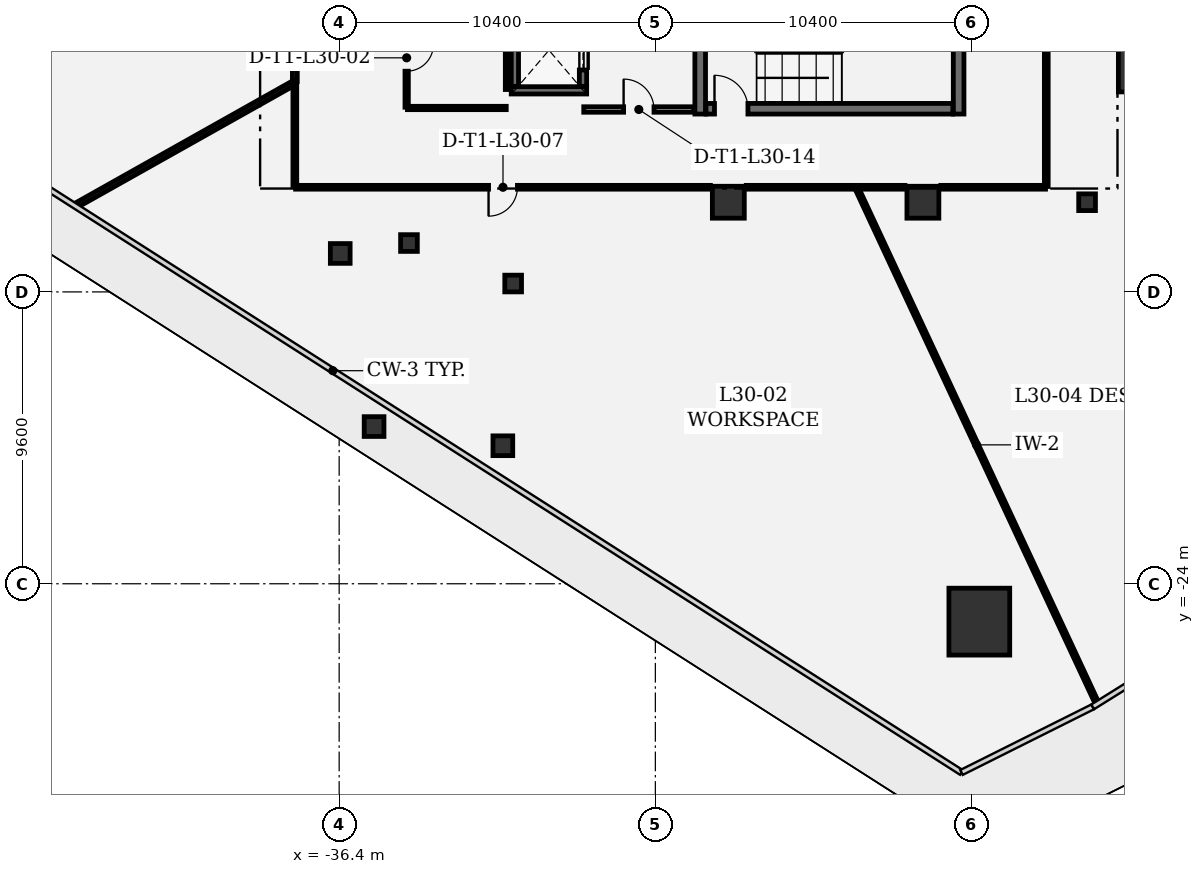
"""IFC4 building model, lengths in metres.
Left out: names, types, materials, properties, quantities, classifications, styles, units other than length and angle.
Written with IfcOpenShell. Run it as: python <this file> out.ifc"""

import sys

from ifc_helpers import new_model, si_unit, direction, frame, frame_2d, origin, origin_2d, place, context, subcontext, project, spatial, rectangle, extrude, element, fill, save


model = new_model("IFC4")
c1 = context("Model", 3, precision=1e-05, world=origin(), true_north=direction((0.0, 1.0)))
c2 = subcontext(c1, "Body", "Model", "MODEL_VIEW")
j1 = project(units=[si_unit("LENGTHUNIT", "METRE"), si_unit("PLANEANGLEUNIT", "RADIAN")], contexts=[c1])
p1 = place(None, origin())
s1 = spatial("IfcSite", under=j1, at=p1, CompositionType="ELEMENT")
p2 = place(p1, origin())
s2 = spatial("IfcBuilding", under=s1, at=p2, CompositionType="ELEMENT")
p3 = place(p2, frame((0.0, 0.0, 134.1)))
s3 = spatial("IfcBuildingStorey", under=s2, at=p3, CompositionType="ELEMENT", Elevation=134.1)
for number, where, z_axis, x_axis in (
    (1, (-15.344, -25.246, 0.0), (0.0, 0.0, 1.0), (1.0, 0.0, 0.0)),
    (2, (-9.77, -6.721, 0.0), (0.0, 0.0, 1.0), (1.0, 0.0, 0.0)),
):
    element("IfcColumn", number, at=place(p3, frame(where, z_axis=z_axis, x_axis=x_axis)), inside=s3, PredefinedType="COLUMN", context=c2, shape_type="SweptSolid", body=[
        extrude(rectangle(XDim=2.0, YDim=2.2, at=origin_2d()), origin(), (0.0, 0.0, 1.0), 4.05),
    ])
for number, where, z_axis, x_axis in (
    (3, (-17.2, -11.45, 0.0), (0.0, 0.0, 1.0), (1.0, 0.0, 0.0)),
    (4, (-23.6, -11.45, 0.0), (0.0, 0.0, 1.0), (1.0, 0.0, 0.0)),
):
    element("IfcColumn", number, at=place(p3, frame(where, z_axis=z_axis, x_axis=x_axis)), inside=s3, PredefinedType="COLUMN", context=c2, shape_type="SweptSolid", body=[
        extrude(rectangle(XDim=1.05, YDim=1.05, at=origin_2d()), origin(), (0.0, 0.0, 1.0), 4.05),
    ])
for number, where, z_axis, x_axis in (
    (5, (-35.252, -18.829, 0.0), (0.0, 0.0, 1.0), (1.0, 0.0, 0.0)),
    (6, (-31.016, -19.46, 0.0), (0.0, 0.0, 1.0), (1.0, 0.0, 0.0)),
    (7, (-36.365, -13.135, 0.0), (0.0, 0.0, 1.0), (1.0, 0.0, 0.0)),
):
    element("IfcColumn", number, at=place(p3, frame(where, z_axis=z_axis, x_axis=x_axis)), inside=s3, PredefinedType="COLUMN", context=c2, shape_type="SweptSolid", body=[
        extrude(rectangle(XDim=0.65, YDim=0.65, at=origin_2d()), origin(), (0.0, 0.0, 1.0), 4.05),
    ])
for number, where, z_axis, x_axis in (
    (8, (-34.104, -12.792, 0.0), (0.0, 0.0, 1.0), (1.0, 0.0, 0.0)),
    (9, (-30.677, -14.124, 0.0), (0.0, 0.0, 1.0), (1.0, 0.0, 0.0)),
    (10, (-11.8, -11.45, 0.0), (0.0, 0.0, 1.0), (1.0, 0.0, 0.0)),
):
    element("IfcColumn", number, at=place(p3, frame(where, z_axis=z_axis, x_axis=x_axis)), inside=s3, PredefinedType="COLUMN", context=c2, shape_type="SweptSolid", body=[
        extrude(rectangle(XDim=0.55, YDim=0.55, at=origin_2d()), origin(), (0.0, 0.0, 1.0), 4.05),
    ])
for number, where, z_axis, x_axis in (
    (11, (-24.525, -4.34, 0.0), (0.0, 0.0, 1.0), (0.0, -1.0, 0.0)),
    (12, (-16.025, -8.55, 0.0), (0.0, 0.0, 1.0), (0.0, 1.0, 0.0)),
):
    element("IfcWall", number, at=place(p3, frame(where, z_axis=z_axis, x_axis=x_axis)), inside=s3, PredefinedType="SHEAR", context=c2, shape_type="SweptSolid", body=[
        extrude(rectangle(XDim=4.21, YDim=0.35, at=frame_2d((2.105, 0.0))), origin(), (0.0, 0.0, 1.0), 3.78),
    ])
p4 = place(p3, frame((-24.335, -8.375, 0.0), z_axis=(0.0, 0.0, 1.0), x_axis=(1.0, 0.0, 0.0)))
e13 = element("IfcWall", 13, at=p4, inside=s3, PredefinedType="SHEAR", context=c2, shape_type="SweptSolid", body=[
    extrude(rectangle(XDim=8.12, YDim=0.35, at=frame_2d((4.06, 0.0))), origin(), (0.0, 0.0, 1.0), 3.78),
])
p5 = place(p4, frame((0.28, 0.0, 0.0)))
e14 = element("IfcOpeningElement", 14, at=p5, cuts=e13, PredefinedType="OPENING", context=c2, shape_type="SweptSolid", body=[
    extrude(rectangle(XDim=1.1, YDim=2.2, at=frame_2d((0.55, 1.1))), frame((0.0, 0.185, 0.0), z_axis=(0.0, -1.0, 0.0), x_axis=(1.0, 0.0, 0.0)), (0.0, 0.0, 1.0), 0.37),
])
p6 = place(p3, frame((-28.26, -7.77, 0.0), z_axis=(0.0, 0.0, 1.0), x_axis=(-1.0, 0.0, 0.0)))
e15 = element("IfcWall", 15, at=p6, inside=s3, PredefinedType="SHEAR", context=c2, shape_type="SweptSolid", body=[
    extrude(rectangle(XDim=2.48, YDim=0.24, at=frame_2d((1.24, 0.0))), origin(), (0.0, 0.0, 1.0), 3.78),
])
p7 = place(p3, frame((-30.62, -7.638, 0.0), z_axis=(0.0, 0.0, 1.0), x_axis=(0.0, 1.0, 0.0)))
e16 = element("IfcWall", 16, at=p7, inside=s3, PredefinedType="SHEAR", context=c2, shape_type="SweptSolid", body=[
    extrude(rectangle(XDim=2.376, YDim=0.24, at=frame_2d((1.188, 0.0))), origin(), (0.0, 0.0, 1.0), 3.78),
])
p8 = place(p3, frame((-28.38, -5.262, 0.0), z_axis=(0.0, 0.0, 1.0), x_axis=(0.0, -1.0, 0.0)))
e17 = element("IfcWall", 17, at=p8, inside=s3, PredefinedType="SHEAR", context=c2, shape_type="SweptSolid", body=[
    extrude(rectangle(XDim=2.376, YDim=0.24, at=frame_2d((1.188, 0.0))), origin(), (0.0, 0.0, 1.0), 3.78),
])
p9 = place(p8, frame((0.538, 0.0, 0.0)))
e18 = element("IfcOpeningElement", 18, at=p9, cuts=e17, PredefinedType="OPENING", context=c2, shape_type="SweptSolid", body=[
    extrude(rectangle(XDim=1.3, YDim=2.3, at=frame_2d((0.65, 1.15))), frame((0.0, 0.13, 0.0), z_axis=(0.0, -1.0, 0.0), x_axis=(1.0, 0.0, 0.0)), (0.0, 0.0, 1.0), 0.26),
])
p10 = place(p3, frame((-28.355, -8.4, 0.0), z_axis=(0.0, 0.0, 1.0), x_axis=(1.0, 0.0, 0.0)))
e19 = element("IfcWall", 19, at=p10, inside=s3, PredefinedType="PARTITIONING", context=c2, shape_type="SweptSolid", body=[
    extrude(rectangle(XDim=3.622, YDim=0.18, at=frame_2d((1.811, 0.0))), origin(), (0.0, 0.0, 1.0), 3.78),
])
p11 = place(p10, frame((1.311, 0.0, 0.0)))
e20 = element("IfcOpeningElement", 20, at=p11, cuts=e19, PredefinedType="OPENING", context=c2, shape_type="SweptSolid", body=[
    extrude(rectangle(XDim=1.0, YDim=2.15, at=frame_2d((0.5, 1.075))), frame((0.0, 0.1, 0.0), z_axis=(0.0, -1.0, 0.0), x_axis=(1.0, 0.0, 0.0)), (0.0, 0.0, 1.0), 0.2),
])
p12 = place(p3, frame((-34.155, -8.35, 0.0), z_axis=(0.0, 0.0, 1.0), x_axis=(1.0, 0.0, 0.0)))
e21 = element("IfcWall", 21, at=p12, inside=s3, PredefinedType="PARTITIONING", context=c2, shape_type="SweptSolid", body=[
    extrude(rectangle(XDim=3.25, YDim=0.11, at=frame_2d((1.625, 0.0))), origin(), (0.0, 0.0, 1.0), 3.78),
])
p13 = place(p3, frame((-30.88, -7.743, 0.0), z_axis=(0.0, 0.0, 1.0), x_axis=(0.0, 1.0, 0.0)))
e22 = element("IfcWall", 22, at=p13, inside=s3, PredefinedType="PARTITIONING", context=c2, shape_type="SweptSolid", body=[
    extrude(rectangle(XDim=2.003, YDim=0.11, at=frame_2d((1.001, 0.0))), origin(), (0.0, 0.0, 1.0), 3.78),
])
p14 = place(p3, frame((-34.18, -5.075, 0.0), z_axis=(0.0, 0.0, 1.0), x_axis=(0.0, -1.0, 0.0)))
e23 = element("IfcWall", 23, at=p14, inside=s3, PredefinedType="PARTITIONING", context=c2, shape_type="SweptSolid", body=[
    extrude(rectangle(XDim=3.25, YDim=0.11, at=frame_2d((1.625, 0.0))), origin(), (0.0, 0.0, 1.0), 3.78),
])
p15 = place(p14, frame((1.185, 0.0, 0.0)))
e24 = element("IfcOpeningElement", 24, at=p15, cuts=e23, PredefinedType="OPENING", context=c2, shape_type="SweptSolid", body=[
    extrude(rectangle(XDim=0.88, YDim=2.1, at=frame_2d((0.44, 1.05))), frame((0.0, 0.065, 0.0), z_axis=(0.0, -1.0, 0.0), x_axis=(1.0, 0.0, 0.0)), (0.0, 0.0, 1.0), 0.13),
])
p16 = place(p3, frame((-37.858, -7.484, 0.0), z_axis=(0.0, 0.0, 1.0), x_axis=(0.0, 1.0, 0.0)))
e25 = element("IfcWall", 25, at=p16, inside=s3, PredefinedType="PARTITIONING", context=c2, shape_type="SweptSolid", body=[
    extrude(rectangle(XDim=2.701, YDim=0.16, at=frame_2d((1.35, 0.0))), origin(), (0.0, 0.0, 1.0), 3.78),
])
p17 = place(p3, frame((-45.017, -11.534, 0.0), z_axis=(0.0, 0.0, 1.0), x_axis=(0.871706095803, 0.490029062954, 0.0)))
e26 = element("IfcWall", 26, at=p17, inside=s3, PredefinedType="PARTITIONING", context=c2, shape_type="SweptSolid", body=[
    extrude(rectangle(XDim=8.188, YDim=0.16, at=frame_2d((4.094, 0.0))), origin(), (0.0, 0.0, 1.0), 3.344),
])
p18 = place(p3, frame((-24.19, -10.958, 0.0), z_axis=(0.0, 0.0, 1.0), x_axis=(-1.0, 0.0, 0.0)))
e27 = element("IfcWall", 27, at=p18, inside=s3, PredefinedType="PARTITIONING", context=c2, shape_type="SweptSolid", body=[
    extrude(rectangle(XDim=13.643, YDim=0.125, at=frame_2d((6.822, 0.0))), origin(), (0.0, 0.0, 1.0), 3.344),
])
p19 = place(p18, frame((6.346, 0.0, 0.0)))
e28 = element("IfcOpeningElement", 28, at=p19, cuts=e27, PredefinedType="OPENING", context=c2, shape_type="SweptSolid", body=[
    extrude(rectangle(XDim=0.95, YDim=2.15, at=frame_2d((0.475, 1.075))), frame((0.0, 0.073, 0.0), z_axis=(0.0, -1.0, 0.0), x_axis=(1.0, 0.0, 0.0)), (0.0, 0.0, 1.0), 0.145),
])
p20 = place(p3, frame((-37.858, -7.632, 0.0), z_axis=(0.0, 0.0, 1.0), x_axis=(0.0, -1.0, 0.0)))
e29 = element("IfcWall", 29, at=p20, inside=s3, PredefinedType="PARTITIONING", context=c2, shape_type="SweptSolid", body=[
    extrude(rectangle(XDim=3.302, YDim=0.125, at=frame_2d((1.651, 0.0))), origin(), (0.0, 0.0, 1.0), 3.78),
])
p21 = place(p3, frame((-11.496, -27.882, 0.0), z_axis=(0.0, 0.0, 1.0), x_axis=(-0.422692669293, 0.906273086507, 0.0)))
e30 = element("IfcWall", 30, at=p21, inside=s3, PredefinedType="PARTITIONING", context=c2, shape_type="SweptSolid", body=[
    extrude(rectangle(XDim=18.649, YDim=0.125, at=frame_2d((9.324, 0.0))), origin(), (0.0, 0.0, 1.0), 3.344),
])
p22 = place(p3, frame((-19.414, -10.958, 0.0), z_axis=(0.0, 0.0, 1.0), x_axis=(-1.0, 0.0, 0.0)))
e31 = element("IfcWall", 31, at=p22, inside=s3, PredefinedType="PARTITIONING", context=c2, shape_type="SweptSolid", body=[
    extrude(rectangle(XDim=3.596, YDim=0.125, at=frame_2d((1.798, 0.0))), origin(), (0.0, 0.0, 1.0), 3.78),
])
p23 = place(p3, frame((-17.79, -10.958, 0.0), z_axis=(0.0, 0.0, 1.0), x_axis=(-1.0, 0.0, 0.0)))
e32 = element("IfcWall", 32, at=p23, inside=s3, PredefinedType="PARTITIONING", context=c2, shape_type="SweptSolid", body=[
    extrude(rectangle(XDim=1.48, YDim=0.125, at=frame_2d((0.74, 0.0))), origin(), (0.0, 0.0, 1.0), 3.78),
])
p24 = place(p3, frame((-13.142, -0.604, 0.0), z_axis=(0.0, 0.0, 1.0), x_axis=(0.0, -1.0, 0.0)))
e33 = element("IfcWall", 33, at=p24, inside=s3, PredefinedType="PARTITIONING", context=c2, shape_type="SweptSolid", body=[
    extrude(rectangle(XDim=10.33, YDim=0.125, at=frame_2d((5.165, 0.0))), origin(), (0.0, 0.0, 1.0), 3.78),
])
p25 = place(p24, frame((4.69, 0.0, 0.0)))
e34 = element("IfcOpeningElement", 34, at=p25, cuts=e33, PredefinedType="OPENING", context=c2, shape_type="SweptSolid", body=[
    extrude(rectangle(XDim=0.95, YDim=2.15, at=frame_2d((0.475, 1.075))), frame((0.0, 0.073, 0.0), z_axis=(0.0, -1.0, 0.0), x_axis=(1.0, 0.0, 0.0)), (0.0, 0.0, 1.0), 0.145),
])
p26 = place(p3, frame((-13.167, -10.958, 0.0), z_axis=(0.0, 0.0, 1.0), x_axis=(-1.0, 0.0, 0.0)))
e35 = element("IfcWall", 35, at=p26, inside=s3, PredefinedType="PARTITIONING", context=c2, shape_type="SweptSolid", body=[
    extrude(rectangle(XDim=3.443, YDim=0.125, at=frame_2d((1.722, 0.0))), origin(), (0.0, 0.0, 1.0), 2.895),
])
p27 = place(p5, origin())
e36 = element("IfcDoor", 36, at=p27, inside=s3, OperationType="SINGLE_SWING_LEFT", PredefinedType="DOOR", context=c2, shape_type="SweptSolid", body=[
    extrude(rectangle(XDim=1.1, YDim=2.2, at=frame_2d((0.55, 1.1))), frame((0.0, 0.025, 0.0), z_axis=(0.0, -1.0, 0.0), x_axis=(1.0, 0.0, 0.0)), (0.0, 0.0, 1.0), 0.05),
])
fill(e14, e36)
p28 = place(p9, origin())
e37 = element("IfcDoor", 37, at=p28, inside=s3, OperationType="DOUBLE_DOOR_SLIDING", PredefinedType="DOOR", context=c2, shape_type="SweptSolid", body=[
    extrude(rectangle(XDim=1.3, YDim=2.3, at=frame_2d((0.65, 1.15))), frame((0.0, 0.025, 0.0), z_axis=(0.0, -1.0, 0.0), x_axis=(1.0, 0.0, 0.0)), (0.0, 0.0, 1.0), 0.05),
])
fill(e18, e37)
p29 = place(p15, origin())
e38 = element("IfcDoor", 38, at=p29, inside=s3, OperationType="SINGLE_SWING_LEFT", PredefinedType="DOOR", context=c2, shape_type="SweptSolid", body=[
    extrude(rectangle(XDim=0.88, YDim=2.1, at=frame_2d((0.44, 1.05))), frame((0.0, 0.025, 0.0), z_axis=(0.0, -1.0, 0.0), x_axis=(1.0, 0.0, 0.0)), (0.0, 0.0, 1.0), 0.05),
])
fill(e24, e38)
p30 = place(p19, origin())
e39 = element("IfcDoor", 39, at=p30, inside=s3, OperationType="SINGLE_SWING_RIGHT", PredefinedType="DOOR", context=c2, shape_type="SweptSolid", body=[
    extrude(rectangle(XDim=0.95, YDim=2.15, at=frame_2d((0.475, 1.075))), frame((0.0, 0.025, 0.0), z_axis=(0.0, -1.0, 0.0), x_axis=(1.0, 0.0, 0.0)), (0.0, 0.0, 1.0), 0.05),
])
fill(e28, e39)
p31 = place(p11, origin())
e40 = element("IfcDoor", 40, at=p31, inside=s3, OperationType="SINGLE_SWING_LEFT", PredefinedType="DOOR", context=c2, shape_type="SweptSolid", body=[
    extrude(rectangle(XDim=1.0, YDim=2.15, at=frame_2d((0.5, 1.075))), frame((0.0, 0.025, 0.0), z_axis=(0.0, -1.0, 0.0), x_axis=(1.0, 0.0, 0.0)), (0.0, 0.0, 1.0), 0.05),
])
fill(e20, e40)
save(model, sys.argv[1])
